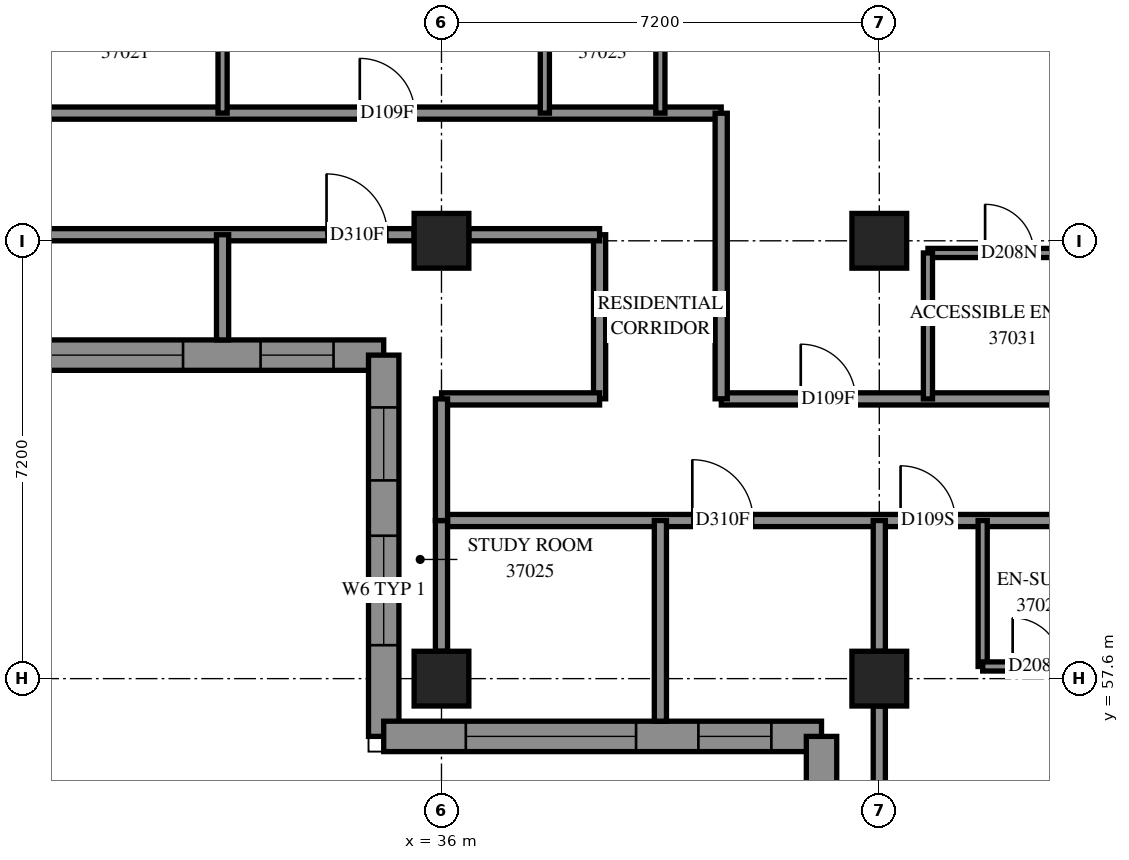
"""IFC4 building model, lengths in metres.
Left out: names, types, materials, properties, quantities, classifications, styles, units other than length and angle.
Written with IfcOpenShell. Run it as: python <this file> out.ifc"""

import sys

from ifc_helpers import new_model, si_unit, direction, frame, frame_2d, origin, origin_2d, place, context, subcontext, project, spatial, polyline, rectangle, outline, extrude, element, fill, save


model = new_model("IFC4")
c1 = context("Model", 3, precision=1e-05, world=origin(), true_north=direction((0.0, 1.0)))
c2 = subcontext(c1, "Body", "Model", "MODEL_VIEW")
j1 = project(units=[si_unit("LENGTHUNIT", "METRE"), si_unit("PLANEANGLEUNIT", "RADIAN")], contexts=[c1])
p1 = place(None, origin())
s1 = spatial("IfcSite", under=j1, at=p1, CompositionType="ELEMENT")
p2 = place(p1, origin())
s2 = spatial("IfcBuilding", under=s1, at=p2, CompositionType="ELEMENT")
p3 = place(p2, frame((0.0, 0.0, 138.8)))
s3 = spatial("IfcBuildingStorey", under=s2, at=p3, CompositionType="ELEMENT", Elevation=138.8)
for number, where, z_axis, x_axis in (
    (1, (36.0, 57.6, 0.0), (0.0, 0.0, 1.0), (1.0, 0.0, 0.0)),
    (2, (36.0, 64.8, 0.0), (0.0, 0.0, 1.0), (1.0, 0.0, 0.0)),
    (3, (43.2, 57.6, 0.0), (0.0, 0.0, 1.0), (1.0, 0.0, 0.0)),
    (4, (43.2, 64.8, 0.0), (0.0, 0.0, 1.0), (1.0, 0.0, 0.0)),
):
    element("IfcColumn", number, at=place(p3, frame(where, z_axis=z_axis, x_axis=x_axis)), inside=s3, PredefinedType="COLUMN", context=c2, shape_type="SweptSolid", body=[
        extrude(rectangle(XDim=0.9, YDim=0.9, at=origin_2d()), origin(), (0.0, 0.0, 1.0), 3.1),
    ])
p4 = place(p3, frame((19.72, 62.92, 0.0), z_axis=(0.0, 0.0, 1.0), x_axis=(1.0, 0.0, 0.0)))
e5 = element("IfcWall", 5, at=p4, inside=s3, PredefinedType="SOLIDWALL", context=c2, shape_type="SweptSolid", body=[
    extrude(outline(polyline([(-0.25, -0.25), (15.08, -0.25), (15.58, 0.25), (0.25, 0.25), (-0.25, -0.25)])), origin(), (0.0, 0.0, 1.0), 3.1),
])
p5 = place(p4, frame((2.28, 0.0, 0.45)))
e6 = element("IfcOpeningElement", 6, at=p5, cuts=e5, PredefinedType="OPENING", context=c2, shape_type="SweptSolid", body=[
    extrude(rectangle(XDim=2.8, YDim=2.5, at=frame_2d((1.4, 1.25))), frame((0.0, 0.26, 0.0), z_axis=(0.0, -1.0, 0.0), x_axis=(1.0, 0.0, 0.0)), (0.0, 0.0, 1.0), 0.52),
])
p6 = place(p4, frame((5.88, 0.0, 0.45)))
e7 = element("IfcOpeningElement", 7, at=p6, cuts=e5, PredefinedType="OPENING", context=c2, shape_type="SweptSolid", body=[
    extrude(rectangle(XDim=2.8, YDim=2.5, at=frame_2d((1.4, 1.25))), frame((0.0, 0.26, 0.0), z_axis=(0.0, -1.0, 0.0), x_axis=(1.0, 0.0, 0.0)), (0.0, 0.0, 1.0), 0.52),
])
p7 = place(p4, frame((9.23, 0.0, 0.45)))
e8 = element("IfcOpeningElement", 8, at=p7, cuts=e5, PredefinedType="OPENING", context=c2, shape_type="SweptSolid", body=[
    extrude(rectangle(XDim=2.8, YDim=2.5, at=frame_2d((1.4, 1.25))), frame((0.0, 0.26, 0.0), z_axis=(0.0, -1.0, 0.0), x_axis=(1.0, 0.0, 0.0)), (0.0, 0.0, 1.0), 0.52),
])
p8 = place(p4, frame((0.565, 0.0, 0.45)))
e9 = element("IfcOpeningElement", 9, at=p8, cuts=e5, PredefinedType="OPENING", context=c2, shape_type="SweptSolid", body=[
    extrude(rectangle(XDim=1.2, YDim=2.5, at=frame_2d((0.6, 1.25))), frame((0.0, 0.26, 0.0), z_axis=(0.0, -1.0, 0.0), x_axis=(1.0, 0.0, 0.0)), (0.0, 0.0, 1.0), 0.52),
])
p9 = place(p4, frame((13.305, 0.0, 0.45)))
e10 = element("IfcOpeningElement", 10, at=p9, cuts=e5, PredefinedType="OPENING", context=c2, shape_type="SweptSolid", body=[
    extrude(rectangle(XDim=1.2, YDim=2.5, at=frame_2d((0.6, 1.25))), frame((0.0, 0.26, 0.0), z_axis=(0.0, -1.0, 0.0), x_axis=(1.0, 0.0, 0.0)), (0.0, 0.0, 1.0), 0.52),
])
p10 = place(p3, frame((35.05, 62.92, 0.0), z_axis=(0.0, 0.0, 1.0), x_axis=(0.0, -1.0, 0.0)))
e11 = element("IfcWall", 11, at=p10, inside=s3, PredefinedType="SOLIDWALL", context=c2, shape_type="SweptSolid", body=[
    extrude(outline(polyline([(0.25, -0.25), (6.52, -0.25), (6.02, 0.25), (-0.25, 0.25), (0.25, -0.25)])), origin(), (0.0, 0.0, 1.0), 3.1),
])
p11 = place(p10, frame((0.86, 0.0, 0.45)))
e12 = element("IfcOpeningElement", 12, at=p11, cuts=e11, PredefinedType="OPENING", context=c2, shape_type="SweptSolid", body=[
    extrude(rectangle(XDim=1.2, YDim=2.5, at=frame_2d((0.6, 1.25))), frame((0.0, 0.26, 0.0), z_axis=(0.0, -1.0, 0.0), x_axis=(1.0, 0.0, 0.0)), (0.0, 0.0, 1.0), 0.52),
])
p12 = place(p10, frame((2.97, 0.0, 0.7)))
e13 = element("IfcOpeningElement", 13, at=p12, cuts=e11, PredefinedType="OPENING", context=c2, shape_type="SweptSolid", body=[
    extrude(rectangle(XDim=1.8, YDim=2.2, at=frame_2d((0.9, 1.1))), frame((0.0, 0.26, 0.0), z_axis=(0.0, -1.0, 0.0), x_axis=(1.0, 0.0, 0.0)), (0.0, 0.0, 1.0), 0.52),
])
p13 = place(p3, frame((35.05, 56.65, 0.0), z_axis=(0.0, 0.0, 1.0), x_axis=(1.0, 0.0, 0.0)))
e14 = element("IfcWall", 14, at=p13, inside=s3, PredefinedType="SOLIDWALL", context=c2, shape_type="SweptSolid", body=[
    extrude(outline(polyline([(-0.25, -0.25), (6.95, -0.25), (7.45, 0.25), (0.25, 0.25), (-0.25, -0.25)])), origin(), (0.0, 0.0, 1.0), 3.1),
])
p14 = place(p13, frame((1.35, 0.0, 0.45)))
e15 = element("IfcOpeningElement", 15, at=p14, cuts=e14, PredefinedType="OPENING", context=c2, shape_type="SweptSolid", body=[
    extrude(rectangle(XDim=2.8, YDim=2.5, at=frame_2d((1.4, 1.25))), frame((0.0, 0.26, 0.0), z_axis=(0.0, -1.0, 0.0), x_axis=(1.0, 0.0, 0.0)), (0.0, 0.0, 1.0), 0.52),
])
p15 = place(p13, frame((5.175, 0.0, 0.45)))
e16 = element("IfcOpeningElement", 16, at=p15, cuts=e14, PredefinedType="OPENING", context=c2, shape_type="SweptSolid", body=[
    extrude(rectangle(XDim=1.2, YDim=2.5, at=frame_2d((0.6, 1.25))), frame((0.0, 0.26, 0.0), z_axis=(0.0, -1.0, 0.0), x_axis=(1.0, 0.0, 0.0)), (0.0, 0.0, 1.0), 0.52),
])
p16 = place(p3, frame((42.25, 56.65, 0.0), z_axis=(0.0, 0.0, 1.0), x_axis=(0.0, -1.0, 0.0)))
e17 = element("IfcWall", 17, at=p16, inside=s3, PredefinedType="SOLIDWALL", context=c2, shape_type="SweptSolid", body=[
    extrude(outline(polyline([(0.25, -0.25), (7.45, -0.25), (6.95, 0.25), (-0.25, 0.25), (0.25, -0.25)])), origin(), (0.0, 0.0, 1.0), 3.1),
])
p17 = place(p16, frame((3.05, 0.0, 0.45)))
e18 = element("IfcOpeningElement", 18, at=p17, cuts=e17, PredefinedType="OPENING", context=c2, shape_type="SweptSolid", body=[
    extrude(rectangle(XDim=2.8, YDim=2.5, at=frame_2d((1.4, 1.25))), frame((0.0, 0.26, 0.0), z_axis=(0.0, -1.0, 0.0), x_axis=(1.0, 0.0, 0.0)), (0.0, 0.0, 1.0), 0.52),
])
p18 = place(p16, frame((0.825, 0.0, 0.45)))
e19 = element("IfcOpeningElement", 19, at=p18, cuts=e17, PredefinedType="OPENING", context=c2, shape_type="SweptSolid", body=[
    extrude(rectangle(XDim=1.2, YDim=2.5, at=frame_2d((0.6, 1.25))), frame((0.0, 0.26, 0.0), z_axis=(0.0, -1.0, 0.0), x_axis=(1.0, 0.0, 0.0)), (0.0, 0.0, 1.0), 0.52),
])
p19 = place(p3, frame((21.6, 66.9, 0.0), z_axis=(0.0, 0.0, 1.0), x_axis=(1.0, 0.0, 0.0)))
e20 = element("IfcWall", 20, at=p19, inside=s3, PredefinedType="PARTITIONING", context=c2, shape_type="SweptSolid", body=[
    extrude(rectangle(XDim=19.0, YDim=0.2, at=frame_2d((9.5, 0.0))), origin(), (0.0, 0.0, 1.0), 3.1),
])
p20 = place(p19, frame((2.3, 0.0, 0.0)))
e21 = element("IfcOpeningElement", 21, at=p20, cuts=e20, PredefinedType="OPENING", context=c2, shape_type="SweptSolid", body=[
    extrude(rectangle(XDim=0.9, YDim=2.1, at=frame_2d((0.45, 1.05))), frame((0.0, 0.11, 0.0), z_axis=(0.0, -1.0, 0.0), x_axis=(1.0, 0.0, 0.0)), (0.0, 0.0, 1.0), 0.22),
])
p21 = place(p19, frame((5.957, 0.0, 0.0)))
e22 = element("IfcOpeningElement", 22, at=p21, cuts=e20, PredefinedType="OPENING", context=c2, shape_type="SweptSolid", body=[
    extrude(rectangle(XDim=0.9, YDim=2.1, at=frame_2d((0.45, 1.05))), frame((0.0, 0.11, 0.0), z_axis=(0.0, -1.0, 0.0), x_axis=(1.0, 0.0, 0.0)), (0.0, 0.0, 1.0), 0.22),
])
p22 = place(p19, frame((13.057, 0.0, 0.0)))
e23 = element("IfcOpeningElement", 23, at=p22, cuts=e20, PredefinedType="OPENING", context=c2, shape_type="SweptSolid", body=[
    extrude(rectangle(XDim=0.9, YDim=2.1, at=frame_2d((0.45, 1.05))), frame((0.0, 0.11, 0.0), z_axis=(0.0, -1.0, 0.0), x_axis=(1.0, 0.0, 0.0)), (0.0, 0.0, 1.0), 0.22),
])
p23 = place(p3, frame((36.0, 60.2, 0.0), z_axis=(0.0, 0.0, 1.0), x_axis=(1.0, 0.0, 0.0)))
e24 = element("IfcWall", 24, at=p23, inside=s3, PredefinedType="PARTITIONING", context=c2, shape_type="SweptSolid", body=[
    extrude(rectangle(XDim=17.0, YDim=0.2, at=frame_2d((8.5, 0.0))), origin(), (0.0, 0.0, 1.0), 3.1),
])
p24 = place(p23, frame((15.805, 0.0, 0.0)))
e25 = element("IfcOpeningElement", 25, at=p24, cuts=e24, PredefinedType="OPENING", context=c2, shape_type="SweptSolid", body=[
    extrude(rectangle(XDim=1.0, YDim=2.1, at=frame_2d((0.5, 1.05))), frame((0.0, 0.11, 0.0), z_axis=(0.0, -1.0, 0.0), x_axis=(1.0, 0.0, 0.0)), (0.0, 0.0, 1.0), 0.22),
])
p25 = place(p23, frame((4.125, 0.0, 0.0)))
e26 = element("IfcOpeningElement", 26, at=p25, cuts=e24, PredefinedType="OPENING", context=c2, shape_type="SweptSolid", body=[
    extrude(rectangle(XDim=1.0, YDim=2.1, at=frame_2d((0.5, 1.05))), frame((0.0, 0.11, 0.0), z_axis=(0.0, -1.0, 0.0), x_axis=(1.0, 0.0, 0.0)), (0.0, 0.0, 1.0), 0.22),
])
p26 = place(p23, frame((7.55, 0.0, 0.0)))
e27 = element("IfcOpeningElement", 27, at=p26, cuts=e24, PredefinedType="OPENING", context=c2, shape_type="SweptSolid", body=[
    extrude(rectangle(XDim=0.9, YDim=2.1, at=frame_2d((0.45, 1.05))), frame((0.0, 0.11, 0.0), z_axis=(0.0, -1.0, 0.0), x_axis=(1.0, 0.0, 0.0)), (0.0, 0.0, 1.0), 0.22),
])
p27 = place(p23, frame((11.635, 0.0, 0.0)))
e28 = element("IfcOpeningElement", 28, at=p27, cuts=e24, PredefinedType="OPENING", context=c2, shape_type="SweptSolid", body=[
    extrude(rectangle(XDim=1.0, YDim=2.1, at=frame_2d((0.5, 1.05))), frame((0.0, 0.11, 0.0), z_axis=(0.0, -1.0, 0.0), x_axis=(1.0, 0.0, 0.0)), (0.0, 0.0, 1.0), 0.22),
])
p28 = place(p3, frame((40.602, 62.2, 0.0), z_axis=(0.0, 0.0, 1.0), x_axis=(1.0, 0.0, 0.0)))
e29 = element("IfcWall", 29, at=p28, inside=s3, PredefinedType="PARTITIONING", context=c2, shape_type="SweptSolid", body=[
    extrude(rectangle(XDim=14.298, YDim=0.2, at=frame_2d((7.149, 0.0))), origin(), (0.0, 0.0, 1.0), 3.1),
])
p29 = place(p28, frame((1.306, 0.0, 0.0)))
e30 = element("IfcOpeningElement", 30, at=p29, cuts=e29, PredefinedType="OPENING", context=c2, shape_type="SweptSolid", body=[
    extrude(rectangle(XDim=0.9, YDim=2.1, at=frame_2d((0.45, 1.05))), frame((0.0, 0.11, 0.0), z_axis=(0.0, -1.0, 0.0), x_axis=(1.0, 0.0, 0.0)), (0.0, 0.0, 1.0), 0.22),
])
p30 = place(p28, frame((8.455, 0.0, 0.0)))
e31 = element("IfcOpeningElement", 31, at=p30, cuts=e29, PredefinedType="OPENING", context=c2, shape_type="SweptSolid", body=[
    extrude(rectangle(XDim=0.9, YDim=2.1, at=frame_2d((0.45, 1.05))), frame((0.0, 0.11, 0.0), z_axis=(0.0, -1.0, 0.0), x_axis=(1.0, 0.0, 0.0)), (0.0, 0.0, 1.0), 0.22),
])
p31 = place(p3, frame((29.25, 64.9, 0.0), z_axis=(0.0, 0.0, 1.0), x_axis=(1.0, 0.0, 0.0)))
e32 = element("IfcWall", 32, at=p31, inside=s3, PredefinedType="PARTITIONING", context=c2, shape_type="SweptSolid", body=[
    extrude(rectangle(XDim=6.3, YDim=0.2, at=frame_2d((3.15, 0.0))), origin(), (0.0, 0.0, 1.0), 2.6),
])
p32 = place(p31, frame((4.86, 0.0, 0.0)))
e33 = element("IfcOpeningElement", 33, at=p32, cuts=e32, PredefinedType="OPENING", context=c2, shape_type="SweptSolid", body=[
    extrude(rectangle(XDim=1.0, YDim=2.1, at=frame_2d((0.5, 1.05))), frame((0.0, 0.11, 0.0), z_axis=(0.0, -1.0, 0.0), x_axis=(1.0, 0.0, 0.0)), (0.0, 0.0, 1.0), 0.22),
])
p33 = place(p3, frame((43.2, 50.85, 0.0), z_axis=(0.0, 0.0, 1.0), x_axis=(0.0, 1.0, 0.0)))
e34 = element("IfcWall", 34, at=p33, inside=s3, PredefinedType="PARTITIONING", context=c2, shape_type="SweptSolid", body=[
    extrude(rectangle(XDim=6.3, YDim=0.2, at=frame_2d((3.15, 0.0))), origin(), (0.0, 0.0, 1.0), 2.6),
])
p34 = place(p3, frame((40.6, 62.202, 0.0), z_axis=(0.0, 0.0, 1.0), x_axis=(0.0, 1.0, 0.0)))
e35 = element("IfcWall", 35, at=p34, inside=s3, PredefinedType="PARTITIONING", context=c2, shape_type="SweptSolid", body=[
    extrude(rectangle(XDim=4.696, YDim=0.2, at=frame_2d((2.348, 0.0))), origin(), (0.0, 0.0, 1.0), 3.1),
])
p35 = place(p3, frame((39.6, 56.9, 0.0), z_axis=(0.0, 0.0, 1.0), x_axis=(0.0, 1.0, 0.0)))
e36 = element("IfcWall", 36, at=p35, inside=s3, PredefinedType="PARTITIONING", context=c2, shape_type="SweptSolid", body=[
    extrude(rectangle(XDim=3.3, YDim=0.2, at=frame_2d((1.65, 0.0))), origin(), (0.0, 0.0, 1.0), 3.1),
])
p36 = place(p3, frame((44.0, 64.6, 0.0), z_axis=(0.0, 0.0, 1.0), x_axis=(1.0, 0.0, 0.0)))
e37 = element("IfcWall", 37, at=p36, inside=s3, PredefinedType="PARTITIONING", context=c2, shape_type="SweptSolid", body=[
    extrude(rectangle(XDim=2.8, YDim=0.15, at=frame_2d((1.4, 0.0))), origin(), (0.0, 0.0, 1.0), 3.1),
])
p37 = place(p36, frame((0.94, 0.0, 0.0)))
e38 = element("IfcOpeningElement", 38, at=p37, cuts=e37, PredefinedType="OPENING", context=c2, shape_type="SweptSolid", body=[
    extrude(rectangle(XDim=0.8, YDim=2.1, at=frame_2d((0.4, 1.05))), frame((0.0, 0.085, 0.0), z_axis=(0.0, -1.0, 0.0), x_axis=(1.0, 0.0, 0.0)), (0.0, 0.0, 1.0), 0.17),
])
p38 = place(p3, frame((38.6, 62.202, 0.0), z_axis=(0.0, 0.0, 1.0), x_axis=(0.0, 1.0, 0.0)))
e39 = element("IfcWall", 39, at=p38, inside=s3, PredefinedType="PARTITIONING", context=c2, shape_type="SweptSolid", body=[
    extrude(rectangle(XDim=2.698, YDim=0.2, at=frame_2d((1.349, 0.0))), origin(), (0.0, 0.0, 1.0), 3.1),
])
p39 = place(p3, frame((36.002, 62.2, 0.0), z_axis=(0.0, 0.0, 1.0), x_axis=(1.0, 0.0, 0.0)))
e40 = element("IfcWall", 40, at=p39, inside=s3, PredefinedType="PARTITIONING", context=c2, shape_type="SweptSolid", body=[
    extrude(rectangle(XDim=2.598, YDim=0.2, at=frame_2d((1.299, 0.0))), origin(), (0.0, 0.0, 1.0), 3.1),
])
for number, where, z_axis, x_axis in (
    (41, (44.9, 57.8, 0.0), (0.0, 0.0, 1.0), (0.0, 1.0, 0.0)),
    (42, (32.4, 66.9, 0.0), (0.0, 0.0, 1.0), (0.0, 1.0, 0.0)),
    (43, (37.7, 66.9, 0.0), (0.0, 0.0, 1.0), (0.0, 1.0, 0.0)),
    (44, (39.6, 66.9, 0.0), (0.0, 0.0, 1.0), (0.0, 1.0, 0.0)),
    (45, (44.0, 62.2, 0.0), (0.0, 0.0, 1.0), (0.0, 1.0, 0.0)),
):
    element("IfcWall", number, at=place(p3, frame(where, z_axis=z_axis, x_axis=x_axis)), inside=s3, PredefinedType="PARTITIONING", context=c2, shape_type="SweptSolid", body=[
        extrude(rectangle(XDim=2.4, YDim=0.15, at=frame_2d((1.2, 0.0))), origin(), (0.0, 0.0, 1.0), 3.1),
    ])
p40 = place(p3, frame((36.0, 58.05, 0.0), z_axis=(0.0, 0.0, 1.0), x_axis=(0.0, 1.0, 0.0)))
e46 = element("IfcWall", 46, at=p40, inside=s3, PredefinedType="PARTITIONING", context=c2, shape_type="SweptSolid", body=[
    extrude(rectangle(XDim=2.15, YDim=0.2, at=frame_2d((1.075, 0.0))), origin(), (0.0, 0.0, 1.0), 2.6),
])
for number, where, z_axis, x_axis in (
    (47, (43.2, 58.05, 0.0), (0.0, 0.0, 1.0), (0.0, 1.0, 0.0)),
    (48, (36.45, 64.9, 0.0), (0.0, 0.0, 1.0), (1.0, 0.0, 0.0)),
):
    element("IfcWall", number, at=place(p3, frame(where, z_axis=z_axis, x_axis=x_axis)), inside=s3, PredefinedType="PARTITIONING", context=c2, shape_type="SweptSolid", body=[
        extrude(rectangle(XDim=2.15, YDim=0.2, at=frame_2d((1.075, 0.0))), origin(), (0.0, 0.0, 1.0), 3.1),
    ])
p41 = place(p3, frame((36.0, 60.2, 0.0), z_axis=(0.0, 0.0, 1.0), x_axis=(0.0, 1.0, 0.0)))
e49 = element("IfcWall", 49, at=p41, inside=s3, PredefinedType="PARTITIONING", context=c2, shape_type="SweptSolid", body=[
    extrude(rectangle(XDim=2.0, YDim=0.2, at=frame_2d((1.0, 0.0))), origin(), (0.0, 0.0, 1.0), 2.6),
])
p42 = place(p3, frame((44.9, 57.8, 0.0), z_axis=(0.0, 0.0, 1.0), x_axis=(1.0, 0.0, 0.0)))
e50 = element("IfcWall", 50, at=p42, inside=s3, PredefinedType="PARTITIONING", context=c2, shape_type="SweptSolid", body=[
    extrude(rectangle(XDim=1.9, YDim=0.15, at=frame_2d((0.95, 0.0))), origin(), (0.0, 0.0, 1.0), 3.1),
])
p43 = place(p42, frame((0.493, 0.0, 0.0)))
e51 = element("IfcOpeningElement", 51, at=p43, cuts=e50, PredefinedType="OPENING", context=c2, shape_type="SweptSolid", body=[
    extrude(rectangle(XDim=0.8, YDim=2.1, at=frame_2d((0.4, 1.05))), frame((0.0, 0.085, 0.0), z_axis=(0.0, -1.0, 0.0), x_axis=(1.0, 0.0, 0.0)), (0.0, 0.0, 1.0), 0.17),
])
p44 = place(p3, frame((32.4, 63.17, 0.0), z_axis=(0.0, 0.0, 1.0), x_axis=(0.0, 1.0, 0.0)))
e52 = element("IfcWall", 52, at=p44, inside=s3, PredefinedType="PARTITIONING", context=c2, shape_type="SweptSolid", body=[
    extrude(rectangle(XDim=1.73, YDim=0.2, at=frame_2d((0.865, 0.0))), origin(), (0.0, 0.0, 1.0), 3.1),
])
p45 = place(p7, origin())
e53 = element("IfcWindow", 53, at=p45, inside=s3, PartitioningType="SINGLE_PANEL", PredefinedType="WINDOW", context=c2, shape_type="SweptSolid", body=[
    extrude(rectangle(XDim=2.8, YDim=2.5, at=frame_2d((1.4, 1.25))), frame((0.0, 0.18, 0.0), z_axis=(0.0, -1.0, 0.0), x_axis=(1.0, 0.0, 0.0)), (0.0, 0.0, 1.0), 0.06),
])
fill(e8, e53)
p46 = place(p9, origin())
e54 = element("IfcWindow", 54, at=p46, inside=s3, PartitioningType="SINGLE_PANEL", PredefinedType="WINDOW", context=c2, shape_type="SweptSolid", body=[
    extrude(rectangle(XDim=1.2, YDim=2.5, at=frame_2d((0.6, 1.25))), frame((0.0, 0.18, 0.0), z_axis=(0.0, -1.0, 0.0), x_axis=(1.0, 0.0, 0.0)), (0.0, 0.0, 1.0), 0.06),
])
fill(e10, e54)
p47 = place(p11, origin())
e55 = element("IfcWindow", 55, at=p47, inside=s3, PartitioningType="SINGLE_PANEL", PredefinedType="WINDOW", context=c2, shape_type="SweptSolid", body=[
    extrude(rectangle(XDim=1.2, YDim=2.5, at=frame_2d((0.6, 1.25))), frame((0.0, 0.18, 0.0), z_axis=(0.0, -1.0, 0.0), x_axis=(1.0, 0.0, 0.0)), (0.0, 0.0, 1.0), 0.06),
])
fill(e12, e55)
p48 = place(p14, origin())
e56 = element("IfcWindow", 56, at=p48, inside=s3, PartitioningType="SINGLE_PANEL", PredefinedType="WINDOW", context=c2, shape_type="SweptSolid", body=[
    extrude(rectangle(XDim=2.8, YDim=2.5, at=frame_2d((1.4, 1.25))), frame((0.0, 0.18, 0.0), z_axis=(0.0, -1.0, 0.0), x_axis=(1.0, 0.0, 0.0)), (0.0, 0.0, 1.0), 0.06),
])
fill(e15, e56)
p49 = place(p15, origin())
e57 = element("IfcWindow", 57, at=p49, inside=s3, PartitioningType="SINGLE_PANEL", PredefinedType="WINDOW", context=c2, shape_type="SweptSolid", body=[
    extrude(rectangle(XDim=1.2, YDim=2.5, at=frame_2d((0.6, 1.25))), frame((0.0, 0.18, 0.0), z_axis=(0.0, -1.0, 0.0), x_axis=(1.0, 0.0, 0.0)), (0.0, 0.0, 1.0), 0.06),
])
fill(e16, e57)
p50 = place(p22, origin())
e58 = element("IfcDoor", 58, at=p50, inside=s3, OperationType="SINGLE_SWING_LEFT", PredefinedType="DOOR", context=c2, shape_type="SweptSolid", body=[
    extrude(rectangle(XDim=0.9, YDim=2.1, at=frame_2d((0.45, 1.05))), frame((0.0, 0.025, 0.0), z_axis=(0.0, -1.0, 0.0), x_axis=(1.0, 0.0, 0.0)), (0.0, 0.0, 1.0), 0.05),
])
fill(e23, e58)
p51 = place(p32, origin())
e59 = element("IfcDoor", 59, at=p51, inside=s3, OperationType="SINGLE_SWING_RIGHT", PredefinedType="DOOR", context=c2, shape_type="SweptSolid", body=[
    extrude(rectangle(XDim=1.0, YDim=2.1, at=frame_2d((0.5, 1.05))), frame((0.0, 0.025, 0.0), z_axis=(0.0, -1.0, 0.0), x_axis=(1.0, 0.0, 0.0)), (0.0, 0.0, 1.0), 0.05),
])
fill(e33, e59)
p52 = place(p25, origin())
e60 = element("IfcDoor", 60, at=p52, inside=s3, OperationType="SINGLE_SWING_RIGHT", PredefinedType="DOOR", context=c2, shape_type="SweptSolid", body=[
    extrude(rectangle(XDim=1.0, YDim=2.1, at=frame_2d((0.5, 1.05))), frame((0.0, 0.025, 0.0), z_axis=(0.0, -1.0, 0.0), x_axis=(1.0, 0.0, 0.0)), (0.0, 0.0, 1.0), 0.05),
])
fill(e26, e60)
p53 = place(p26, origin())
e61 = element("IfcDoor", 61, at=p53, inside=s3, OperationType="SINGLE_SWING_LEFT", PredefinedType="DOOR", context=c2, shape_type="SweptSolid", body=[
    extrude(rectangle(XDim=0.9, YDim=2.1, at=frame_2d((0.45, 1.05))), frame((0.0, 0.025, 0.0), z_axis=(0.0, -1.0, 0.0), x_axis=(1.0, 0.0, 0.0)), (0.0, 0.0, 1.0), 0.05),
])
fill(e27, e61)
p54 = place(p43, origin())
e62 = element("IfcDoor", 62, at=p54, inside=s3, OperationType="SINGLE_SWING_RIGHT", PredefinedType="DOOR", context=c2, shape_type="SweptSolid", body=[
    extrude(rectangle(XDim=0.8, YDim=2.1, at=frame_2d((0.4, 1.05))), frame((0.0, 0.025, 0.0), z_axis=(0.0, -1.0, 0.0), x_axis=(1.0, 0.0, 0.0)), (0.0, 0.0, 1.0), 0.05),
])
fill(e51, e62)
p55 = place(p29, origin())
e63 = element("IfcDoor", 63, at=p55, inside=s3, OperationType="SINGLE_SWING_LEFT", PredefinedType="DOOR", context=c2, shape_type="SweptSolid", body=[
    extrude(rectangle(XDim=0.9, YDim=2.1, at=frame_2d((0.45, 1.05))), frame((0.0, 0.025, 0.0), z_axis=(0.0, -1.0, 0.0), x_axis=(1.0, 0.0, 0.0)), (0.0, 0.0, 1.0), 0.05),
])
fill(e30, e63)
p56 = place(p37, origin())
e64 = element("IfcDoor", 64, at=p56, inside=s3, OperationType="SINGLE_SWING_RIGHT", PredefinedType="DOOR", context=c2, shape_type="SweptSolid", body=[
    extrude(rectangle(XDim=0.8, YDim=2.1, at=frame_2d((0.4, 1.05))), frame((0.0, 0.025, 0.0), z_axis=(0.0, -1.0, 0.0), x_axis=(1.0, 0.0, 0.0)), (0.0, 0.0, 1.0), 0.05),
])
fill(e38, e64)
p57 = place(p12, origin())
e65 = element("IfcWindow", 65, at=p57, inside=s3, PartitioningType="SINGLE_PANEL", PredefinedType="WINDOW", context=c2, shape_type="SweptSolid", body=[
    extrude(rectangle(XDim=1.8, YDim=2.2, at=frame_2d((0.9, 1.1))), frame((0.0, 0.18, 0.0), z_axis=(0.0, -1.0, 0.0), x_axis=(1.0, 0.0, 0.0)), (0.0, 0.0, 1.0), 0.06),
])
fill(e13, e65)
save(model, sys.argv[1])
